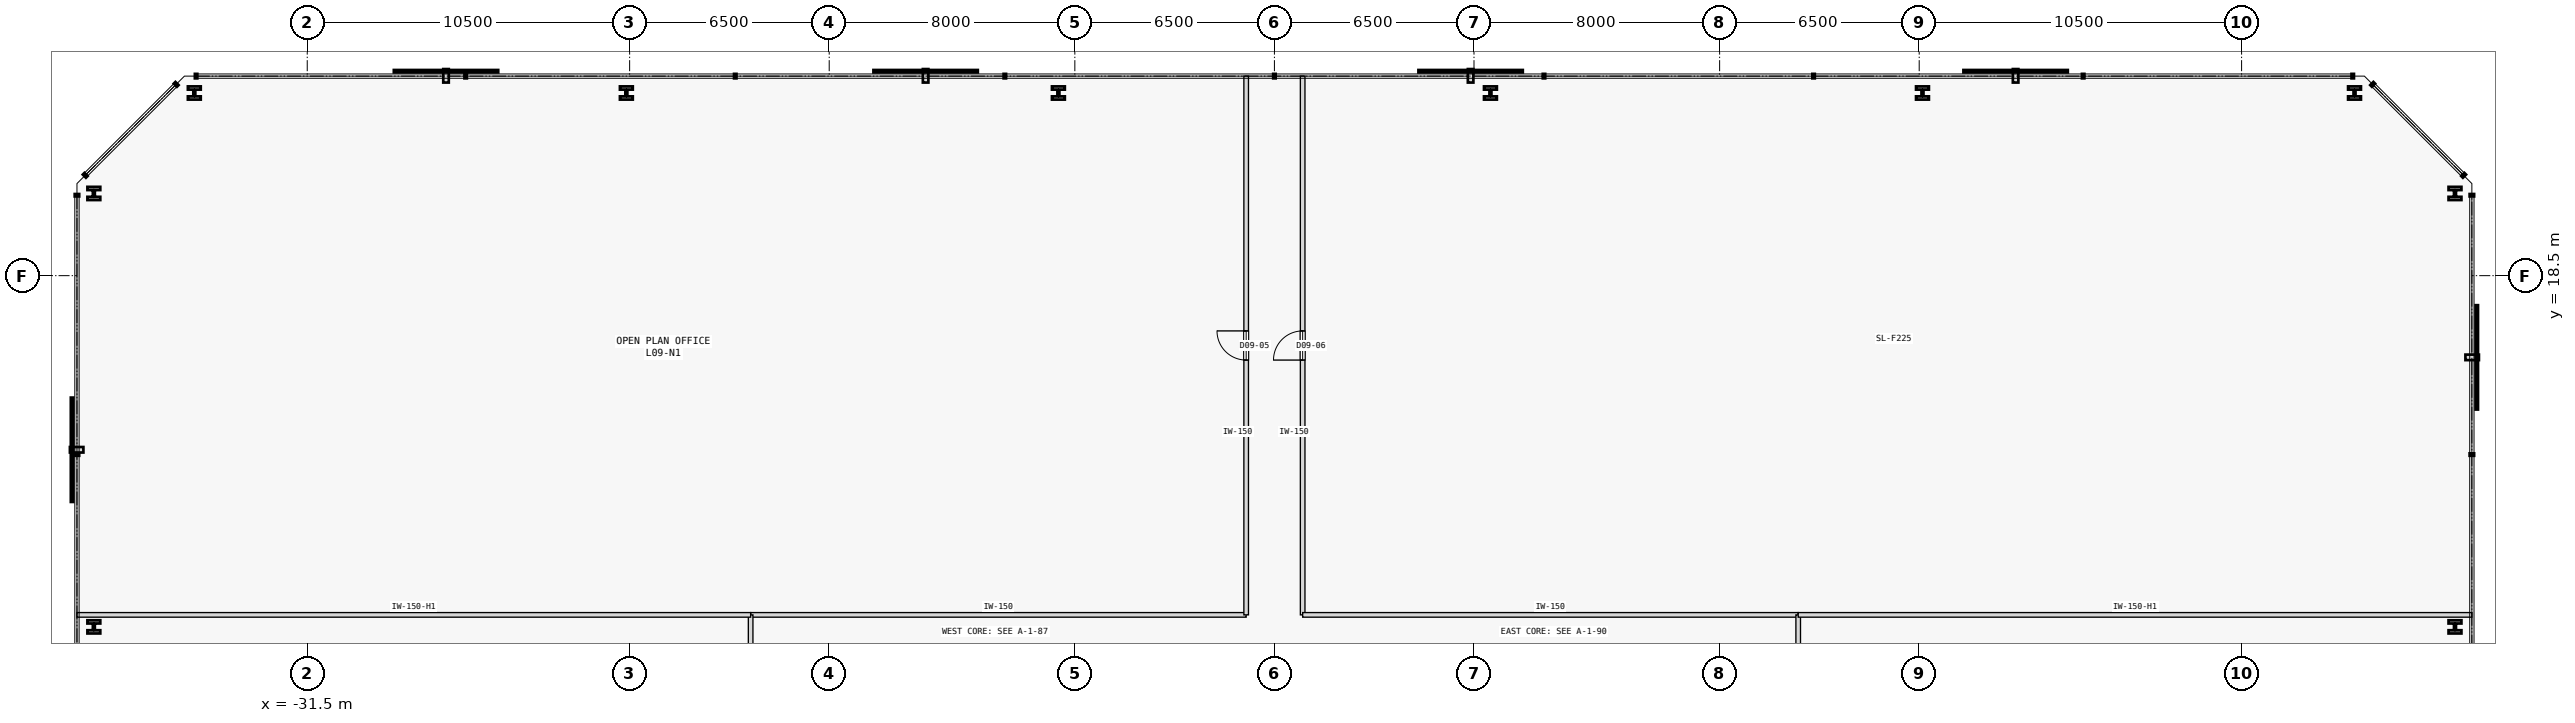
"""IFC4 building model, lengths in metres.
Left out: names, types, materials, properties, quantities, classifications, styles, units other than length and angle.
Written with IfcOpenShell. Run it as: python <this file> out.ifc"""

import sys

from ifc_helpers import new_model, si_unit, direction, frame, frame_2d, origin, origin_2d, place, context, subcontext, project, spatial, rectangle, i_section, extrude, element, fill, save


model = new_model("IFC4")
c1 = context("Model", 3, precision=1e-05, world=origin(), true_north=direction((0.0, 1.0)))
c2 = subcontext(c1, "Body", "Model", "MODEL_VIEW")
j1 = project(units=[si_unit("LENGTHUNIT", "METRE"), si_unit("PLANEANGLEUNIT", "RADIAN")], contexts=[c1])
p1 = place(None, origin())
s1 = spatial("IfcSite", under=j1, at=p1, CompositionType="ELEMENT")
p2 = place(p1, origin())
s2 = spatial("IfcBuilding", under=s1, at=p2, CompositionType="ELEMENT")
p3 = place(p2, frame((0.0, 0.0, 40.8)))
s3 = spatial("IfcBuildingStorey", under=s2, at=p3, CompositionType="ELEMENT", Elevation=40.8)
for number, where, z_axis, x_axis in (
    (1, (38.45, 7.059, 0.0), (0.0, 0.0, 1.0), (1.0, 0.0, 0.0)),
    (2, (38.45, 21.178, 0.0), (0.0, 0.0, 1.0), (1.0, 0.0, 0.0)),
    (3, (35.178, 24.45, 0.0), (0.0, 0.0, 1.0), (1.0, 0.0, 0.0)),
    (4, (21.107, 24.45, 0.0), (0.0, 0.0, 1.0), (1.0, 0.0, 0.0)),
    (5, (7.036, 24.45, 0.0), (0.0, 0.0, 1.0), (1.0, 0.0, 0.0)),
    (6, (-7.036, 24.45, 0.0), (0.0, 0.0, 1.0), (1.0, 0.0, 0.0)),
    (7, (-21.107, 24.45, 0.0), (0.0, 0.0, 1.0), (1.0, 0.0, 0.0)),
    (8, (-35.178, 24.45, 0.0), (0.0, 0.0, 1.0), (1.0, 0.0, 0.0)),
    (9, (-38.45, 21.178, 0.0), (0.0, 0.0, 1.0), (1.0, 0.0, 0.0)),
    (10, (-38.45, 7.059, 0.0), (0.0, 0.0, 1.0), (1.0, 0.0, 0.0)),
):
    element("IfcColumn", number, at=place(p3, frame(where, z_axis=z_axis, x_axis=x_axis)), inside=s3, PredefinedType="COLUMN", context=c2, shape_type="SweptSolid", body=[
        extrude(i_section(OverallWidth=0.42, OverallDepth=0.431, WebThickness=0.065, FlangeThickness=0.106, FilletRadius=0.015, at=origin_2d()), origin(), (0.0, 0.0, 1.0), 3.8),
    ])
p4 = place(p3, frame((-17.059, 7.45, 0.0), z_axis=(0.0, 0.0, 1.0), x_axis=(1.0, 0.0, 0.0)))
e11 = element("IfcWall", 11, at=p4, inside=s3, PredefinedType="PARTITIONING", context=c2, shape_type="SweptSolid", body=[
    extrude(rectangle(XDim=16.139, YDim=0.15, at=frame_2d((8.07, 0.0))), origin(), (0.0, 0.0, 1.0), 3.575),
])
p5 = place(p3, frame((-0.92, 7.45, 0.0), z_axis=(0.0, 0.0, 1.0), x_axis=(0.0, 1.0, 0.0)))
e12 = element("IfcWall", 12, at=p5, inside=s3, PredefinedType="PARTITIONING", context=c2, shape_type="SweptSolid", body=[
    extrude(rectangle(XDim=17.55, YDim=0.15, at=frame_2d((8.775, 0.0))), origin(), (0.0, 0.0, 1.0), 3.575),
])
p6 = place(p5, frame((8.3, 0.0, 0.0)))
e13 = element("IfcOpeningElement", 13, at=p6, cuts=e12, PredefinedType="OPENING", context=c2, shape_type="SweptSolid", body=[
    extrude(rectangle(XDim=0.95, YDim=2.15, at=frame_2d((0.475, 1.075))), frame((0.0, 0.085, 0.0), z_axis=(0.0, -1.0, 0.0), x_axis=(1.0, 0.0, 0.0)), (0.0, 0.0, 1.0), 0.17),
])
p7 = place(p3, frame((0.92, 7.45, 0.0), z_axis=(0.0, 0.0, 1.0), x_axis=(0.0, 1.0, 0.0)))
e14 = element("IfcWall", 14, at=p7, inside=s3, PredefinedType="PARTITIONING", context=c2, shape_type="SweptSolid", body=[
    extrude(rectangle(XDim=17.55, YDim=0.15, at=frame_2d((8.775, 0.0))), origin(), (0.0, 0.0, 1.0), 3.575),
])
p8 = place(p7, frame((8.3, 0.0, 0.0)))
e15 = element("IfcOpeningElement", 15, at=p8, cuts=e14, PredefinedType="OPENING", context=c2, shape_type="SweptSolid", body=[
    extrude(rectangle(XDim=0.95, YDim=2.15, at=frame_2d((0.475, 1.075))), frame((0.0, 0.085, 0.0), z_axis=(0.0, -1.0, 0.0), x_axis=(1.0, 0.0, 0.0)), (0.0, 0.0, 1.0), 0.17),
])
p9 = place(p3, frame((0.92, 7.45, 0.0), z_axis=(0.0, 0.0, 1.0), x_axis=(1.0, 0.0, 0.0)))
e16 = element("IfcWall", 16, at=p9, inside=s3, PredefinedType="PARTITIONING", context=c2, shape_type="SweptSolid", body=[
    extrude(rectangle(XDim=16.139, YDim=0.15, at=frame_2d((8.07, 0.0))), origin(), (0.0, 0.0, 1.0), 3.575),
])
for number, where, z_axis, x_axis in (
    (17, (-17.059, 0.92, 0.0), (0.0, 0.0, 1.0), (0.0, 1.0, 0.0)),
    (18, (17.059, 0.92, 0.0), (0.0, 0.0, 1.0), (0.0, 1.0, 0.0)),
):
    element("IfcWall", number, at=place(p3, frame(where, z_axis=z_axis, x_axis=x_axis)), inside=s3, PredefinedType="PARTITIONING", context=c2, shape_type="SweptSolid", body=[
        extrude(rectangle(XDim=6.53, YDim=0.15, at=frame_2d((3.265, 0.0))), origin(), (0.0, 0.0, 1.0), 3.575),
    ])
for number, where, z_axis, x_axis in (
    (19, (-39.0, 7.45, 0.0), (0.0, 0.0, 1.0), (1.0, 0.0, 0.0)),
    (20, (17.059, 7.45, 0.0), (0.0, 0.0, 1.0), (1.0, 0.0, 0.0)),
):
    element("IfcWall", number, at=place(p3, frame(where, z_axis=z_axis, x_axis=x_axis)), inside=s3, PredefinedType="PARTITIONING", context=c2, shape_type="SweptSolid", body=[
        extrude(rectangle(XDim=21.941, YDim=0.15, at=frame_2d((10.97, 0.0))), origin(), (0.0, 0.0, 1.0), 3.125),
    ])
p10 = place(p6, origin())
e21 = element("IfcDoor", 21, at=p10, inside=s3, OperationType="SINGLE_SWING_RIGHT", PredefinedType="DOOR", context=c2, shape_type="SweptSolid", body=[
    extrude(rectangle(XDim=0.95, YDim=2.15, at=frame_2d((0.475, 1.075))), frame((0.0, 0.025, 0.0), z_axis=(0.0, -1.0, 0.0), x_axis=(1.0, 0.0, 0.0)), (0.0, 0.0, 1.0), 0.05),
])
fill(e13, e21)
p11 = place(p8, origin())
e22 = element("IfcDoor", 22, at=p11, inside=s3, OperationType="SINGLE_SWING_LEFT", PredefinedType="DOOR", context=c2, shape_type="SweptSolid", body=[
    extrude(rectangle(XDim=0.95, YDim=2.15, at=frame_2d((0.475, 1.075))), frame((0.0, 0.025, 0.0), z_axis=(0.0, -1.0, 0.0), x_axis=(1.0, 0.0, 0.0)), (0.0, 0.0, 1.0), 0.05),
])
fill(e15, e22)
save(model, sys.argv[1])
